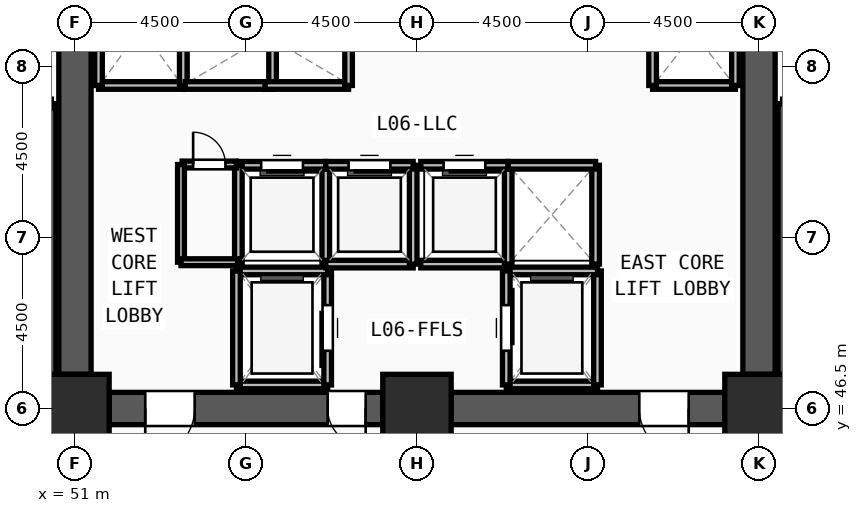
"""IFC4 building model, lengths in metres.
Left out: names, types, materials, properties, quantities, classifications, styles, units other than length and angle.
Written with IfcOpenShell. Run it as: python <this file> out.ifc"""

import sys

from ifc_helpers import new_model, si_unit, direction, frame, frame_2d, origin, origin_2d, place, context, subcontext, project, spatial, rectangle, extrude, source, transform, mapped, element, fill, save


model = new_model("IFC4")
c1 = context("Model", 3, precision=1e-05, world=origin(), true_north=direction((0.0, 1.0)))
c2 = subcontext(c1, "Body", "Model", "MODEL_VIEW")
j1 = project(units=[si_unit("LENGTHUNIT", "METRE"), si_unit("PLANEANGLEUNIT", "RADIAN")], contexts=[c1])
p1 = place(None, origin())
s1 = spatial("IfcSite", under=j1, at=p1, CompositionType="ELEMENT")
p2 = place(p1, origin())
s2 = spatial("IfcBuilding", under=s1, at=p2, CompositionType="ELEMENT")
p3 = place(p2, frame((0.0, 0.0, 23.4)))
s3 = spatial("IfcBuildingStorey", under=s2, at=p3, CompositionType="ELEMENT", Elevation=23.4)
m1 = source(origin(), c2, "Body", "SweptSolid", [
    extrude(rectangle(XDim=1.8, YDim=1.8, at=origin_2d()), origin(), (0.0, 0.0, 1.0), 5.1),
])
for number, where, z_axis, x_axis in (
    (1, (51.0, 46.5, 0.0), (0.0, 0.0, 1.0), (1.0, 0.0, 0.0)),
    (2, (60.0, 46.5, 0.0), (0.0, 0.0, 1.0), (1.0, 0.0, 0.0)),
    (3, (69.0, 46.5, 0.0), (0.0, 0.0, 1.0), (1.0, 0.0, 0.0)),
):
    element("IfcColumn", number, at=place(p3, frame(where, z_axis=z_axis, x_axis=x_axis)), inside=s3, PredefinedType="COLUMN", context=c2, shape_type="MappedRepresentation", body=[
        mapped(m1, transform((0.0, 0.0, 0.0), x_axis=(1.0, 0.0, 0.0), y_axis=(0.0, 1.0, 0.0), z_axis=(0.0, 0.0, 1.0), scale=1.0)),
    ])
p4 = place(p3, frame((69.0, 60.6, 0.0), z_axis=(0.0, 0.0, 1.0), x_axis=(0.0, -1.0, 0.0)))
e4 = element("IfcWall", 4, at=p4, inside=s3, PredefinedType="SHEAR", context=c2, shape_type="SweptSolid", body=[
    extrude(rectangle(XDim=13.2, YDim=0.85, at=frame_2d((6.6, 0.0))), origin(), (0.0, 0.0, 1.0), 4.82),
])
m2 = source(origin(), c2, "Body", "SweptSolid", [
    extrude(rectangle(XDim=1.2, YDim=2.2, at=frame_2d((0.6, 1.1))), frame((0.0, 0.435, 0.0), z_axis=(0.0, -1.0, 0.0), x_axis=(1.0, 0.0, 0.0)), (0.0, 0.0, 1.0), 0.87),
])
p5 = place(p4, frame((1.05, 0.0, 0.0)))
e5 = element("IfcOpeningElement", 5, at=p5, cuts=e4, PredefinedType="OPENING", context=c2, shape_type="MappedRepresentation", body=[
    mapped(m2, transform((0.0, 0.0, 0.0), x_axis=(1.0, 0.0, 0.0), y_axis=(0.0, 1.0, 0.0), z_axis=(0.0, 0.0, 1.0), scale=1.0)),
])
p6 = place(p3, frame((68.1, 46.5, 0.0), z_axis=(0.0, 0.0, 1.0), x_axis=(-1.0, 0.0, 0.0)))
e6 = element("IfcWall", 6, at=p6, inside=s3, PredefinedType="SHEAR", context=c2, shape_type="SweptSolid", body=[
    extrude(rectangle(XDim=7.2, YDim=0.85, at=frame_2d((3.6, 0.0))), origin(), (0.0, 0.0, 1.0), 4.82),
])
m3 = source(origin(), c2, "Body", "SweptSolid", [
    extrude(rectangle(XDim=1.3, YDim=2.2, at=frame_2d((0.65, 1.1))), frame((0.0, 0.435, 0.0), z_axis=(0.0, -1.0, 0.0), x_axis=(1.0, 0.0, 0.0)), (0.0, 0.0, 1.0), 0.87),
])
p7 = place(p6, frame((0.95, 0.0, 0.0)))
e7 = element("IfcOpeningElement", 7, at=p7, cuts=e6, PredefinedType="OPENING", context=c2, shape_type="MappedRepresentation", body=[
    mapped(m3, transform((0.0, 0.0, 0.0), x_axis=(1.0, 0.0, 0.0), y_axis=(0.0, 1.0, 0.0), z_axis=(0.0, 0.0, 1.0), scale=1.0)),
])
p8 = place(p3, frame((59.1, 46.5, 0.0), z_axis=(0.0, 0.0, 1.0), x_axis=(-1.0, 0.0, 0.0)))
e8 = element("IfcWall", 8, at=p8, inside=s3, PredefinedType="SHEAR", context=c2, shape_type="SweptSolid", body=[
    extrude(rectangle(XDim=7.2, YDim=0.85, at=frame_2d((3.6, 0.0))), origin(), (0.0, 0.0, 1.0), 4.82),
])
p9 = place(p8, frame((4.95, 0.0, 0.0)))
e9 = element("IfcOpeningElement", 9, at=p9, cuts=e8, PredefinedType="OPENING", context=c2, shape_type="MappedRepresentation", body=[
    mapped(m3, transform((0.0, 0.0, 0.0), x_axis=(1.0, 0.0, 0.0), y_axis=(0.0, 1.0, 0.0), z_axis=(0.0, 0.0, 1.0), scale=1.0)),
])
m4 = source(origin(), c2, "Body", "SweptSolid", [
    extrude(rectangle(XDim=1.0, YDim=2.2, at=frame_2d((0.5, 1.1))), frame((0.0, 0.435, 0.0), z_axis=(0.0, -1.0, 0.0), x_axis=(1.0, 0.0, 0.0)), (0.0, 0.0, 1.0), 0.87),
])
p10 = place(p8, frame((0.45, 0.0, 0.0)))
e10 = element("IfcOpeningElement", 10, at=p10, cuts=e8, PredefinedType="OPENING", context=c2, shape_type="MappedRepresentation", body=[
    mapped(m4, transform((0.0, 0.0, 0.0), x_axis=(1.0, 0.0, 0.0), y_axis=(0.0, 1.0, 0.0), z_axis=(0.0, 0.0, 1.0), scale=1.0)),
])
p11 = place(p3, frame((51.0, 47.4, 0.0), z_axis=(0.0, 0.0, 1.0), x_axis=(0.0, 1.0, 0.0)))
e11 = element("IfcWall", 11, at=p11, inside=s3, PredefinedType="SHEAR", context=c2, shape_type="SweptSolid", body=[
    extrude(rectangle(XDim=13.2, YDim=0.85, at=frame_2d((6.6, 0.0))), origin(), (0.0, 0.0, 1.0), 4.82),
])
for number, where, z_axis, x_axis in (
    (12, (50.38, 46.7, 0.0), (0.0, 0.0, 1.0), (0.0, 1.0, 0.0)),
    (13, (69.62, 54.52, 0.0), (0.0, 0.0, 1.0), (0.0, -1.0, 0.0)),
):
    element("IfcWall", number, at=place(p3, frame(where, z_axis=z_axis, x_axis=x_axis)), inside=s3, PredefinedType="SOLIDWALL", context=c2, shape_type="SweptSolid", body=[
        extrude(rectangle(XDim=7.82, YDim=0.24, at=frame_2d((3.91, 0.0))), origin(), (0.0, 0.0, 1.0), 4.82),
    ])
p12 = place(p3, frame((55.25, 47.12, 0.0), z_axis=(0.0, 0.0, 1.0), x_axis=(1.0, 0.0, 0.0)))
e14 = element("IfcWall", 14, at=p12, inside=s3, PredefinedType="SOLIDWALL", context=c2, shape_type="SweptSolid", body=[
    extrude(rectangle(XDim=2.4, YDim=0.2, at=frame_2d((1.2, 0.0))), origin(), (0.0, 0.0, 1.0), 4.82),
])
p13 = place(p3, frame((57.65, 47.12, 0.0), z_axis=(0.0, 0.0, 1.0), x_axis=(0.0, 1.0, 0.0)))
e15 = element("IfcWall", 15, at=p13, inside=s3, PredefinedType="SOLIDWALL", context=c2, shape_type="SweptSolid", body=[
    extrude(rectangle(XDim=3.0, YDim=0.2, at=frame_2d((1.5, 0.0))), origin(), (0.0, 0.0, 1.0), 4.82),
])
m5 = source(origin(), c2, "Body", "SweptSolid", [
    extrude(rectangle(XDim=1.2, YDim=2.3, at=frame_2d((0.6, 1.15))), frame((0.0, 0.11, 0.0), z_axis=(0.0, -1.0, 0.0), x_axis=(1.0, 0.0, 0.0)), (0.0, 0.0, 1.0), 0.22),
])
p14 = place(p13, frame((0.9, 0.0, 0.0)))
e16 = element("IfcOpeningElement", 16, at=p14, cuts=e15, PredefinedType="OPENING", context=c2, shape_type="MappedRepresentation", body=[
    mapped(m5, transform((0.0, 0.0, 0.0), x_axis=(1.0, 0.0, 0.0), y_axis=(0.0, 1.0, 0.0), z_axis=(0.0, 0.0, 1.0), scale=1.0)),
])
p15 = place(p3, frame((57.65, 50.12, 0.0), z_axis=(0.0, 0.0, 1.0), x_axis=(-1.0, 0.0, 0.0)))
e17 = element("IfcWall", 17, at=p15, inside=s3, PredefinedType="SOLIDWALL", context=c2, shape_type="SweptSolid", body=[
    extrude(rectangle(XDim=2.4, YDim=0.2, at=frame_2d((1.2, 0.0))), origin(), (0.0, 0.0, 1.0), 4.82),
])
p16 = place(p3, frame((55.25, 50.12, 0.0), z_axis=(0.0, 0.0, 1.0), x_axis=(0.0, -1.0, 0.0)))
e18 = element("IfcWall", 18, at=p16, inside=s3, PredefinedType="SOLIDWALL", context=c2, shape_type="SweptSolid", body=[
    extrude(rectangle(XDim=3.0, YDim=0.2, at=frame_2d((1.5, 0.0))), origin(), (0.0, 0.0, 1.0), 4.82),
])
p17 = place(p3, frame((62.35, 47.12, 0.0), z_axis=(0.0, 0.0, 1.0), x_axis=(1.0, 0.0, 0.0)))
e19 = element("IfcWall", 19, at=p17, inside=s3, PredefinedType="SOLIDWALL", context=c2, shape_type="SweptSolid", body=[
    extrude(rectangle(XDim=2.4, YDim=0.2, at=frame_2d((1.2, 0.0))), origin(), (0.0, 0.0, 1.0), 4.82),
])
p18 = place(p3, frame((64.75, 47.12, 0.0), z_axis=(0.0, 0.0, 1.0), x_axis=(0.0, 1.0, 0.0)))
e20 = element("IfcWall", 20, at=p18, inside=s3, PredefinedType="SOLIDWALL", context=c2, shape_type="SweptSolid", body=[
    extrude(rectangle(XDim=3.0, YDim=0.2, at=frame_2d((1.5, 0.0))), origin(), (0.0, 0.0, 1.0), 4.82),
])
p19 = place(p3, frame((64.75, 50.12, 0.0), z_axis=(0.0, 0.0, 1.0), x_axis=(-1.0, 0.0, 0.0)))
e21 = element("IfcWall", 21, at=p19, inside=s3, PredefinedType="SOLIDWALL", context=c2, shape_type="SweptSolid", body=[
    extrude(rectangle(XDim=2.4, YDim=0.2, at=frame_2d((1.2, 0.0))), origin(), (0.0, 0.0, 1.0), 4.82),
])
p20 = place(p3, frame((62.35, 50.12, 0.0), z_axis=(0.0, 0.0, 1.0), x_axis=(0.0, -1.0, 0.0)))
e22 = element("IfcWall", 22, at=p20, inside=s3, PredefinedType="SOLIDWALL", context=c2, shape_type="SweptSolid", body=[
    extrude(rectangle(XDim=3.0, YDim=0.2, at=frame_2d((1.5, 0.0))), origin(), (0.0, 0.0, 1.0), 4.82),
])
p21 = place(p20, frame((0.9, 0.0, 0.0)))
e23 = element("IfcOpeningElement", 23, at=p21, cuts=e22, PredefinedType="OPENING", context=c2, shape_type="MappedRepresentation", body=[
    mapped(m5, transform((0.0, 0.0, 0.0), x_axis=(1.0, 0.0, 0.0), y_axis=(0.0, 1.0, 0.0), z_axis=(0.0, 0.0, 1.0), scale=1.0)),
])
p22 = place(p3, frame((51.62, 55.0, 0.0), z_axis=(0.0, 0.0, 1.0), x_axis=(1.0, 0.0, 0.0)))
e24 = element("IfcWall", 24, at=p22, inside=s3, PredefinedType="SOLIDWALL", context=c2, shape_type="SweptSolid", body=[
    extrude(rectangle(XDim=2.23, YDim=0.2, at=frame_2d((1.115, 0.0))), origin(), (0.0, 0.0, 1.0), 4.82),
])
for number, where, z_axis, x_axis in (
    (25, (53.85, 55.0, 0.0), (0.0, 0.0, 1.0), (0.0, 1.0, 0.0)),
    (26, (51.62, 58.0, 0.0), (0.0, 0.0, 1.0), (0.0, -1.0, 0.0)),
):
    element("IfcWall", number, at=place(p3, frame(where, z_axis=z_axis, x_axis=x_axis)), inside=s3, PredefinedType="SOLIDWALL", context=c2, shape_type="SweptSolid", body=[
        extrude(rectangle(XDim=3.0, YDim=0.2, at=frame_2d((1.5, 0.0))), origin(), (0.0, 0.0, 1.0), 4.82),
    ])
p23 = place(p3, frame((66.2, 55.0, 0.0), z_axis=(0.0, 0.0, 1.0), x_axis=(1.0, 0.0, 0.0)))
e27 = element("IfcWall", 27, at=p23, inside=s3, PredefinedType="SOLIDWALL", context=c2, shape_type="SweptSolid", body=[
    extrude(rectangle(XDim=2.18, YDim=0.2, at=frame_2d((1.09, 0.0))), origin(), (0.0, 0.0, 1.0), 4.82),
])
for number, where, z_axis, x_axis in (
    (28, (68.38, 55.0, 0.0), (0.0, 0.0, 1.0), (0.0, 1.0, 0.0)),
    (29, (66.2, 57.75, 0.0), (0.0, 0.0, 1.0), (0.0, -1.0, 0.0)),
):
    element("IfcWall", number, at=place(p3, frame(where, z_axis=z_axis, x_axis=x_axis)), inside=s3, PredefinedType="SOLIDWALL", context=c2, shape_type="SweptSolid", body=[
        extrude(rectangle(XDim=2.75, YDim=0.2, at=frame_2d((1.375, 0.0))), origin(), (0.0, 0.0, 1.0), 4.82),
    ])
p24 = place(p3, frame((57.6, 50.3, 0.0), z_axis=(0.0, 0.0, 1.0), x_axis=(0.0, 1.0, 0.0)))
e30 = element("IfcWall", 30, at=p24, inside=s3, PredefinedType="SOLIDWALL", context=c2, shape_type="SweptSolid", body=[
    extrude(rectangle(XDim=2.6, YDim=0.2, at=frame_2d((1.3, 0.0))), origin(), (0.0, 0.0, 1.0), 4.82),
])
p25 = place(p3, frame((57.6, 52.9, 0.0), z_axis=(0.0, 0.0, 1.0), x_axis=(-1.0, 0.0, 0.0)))
e31 = element("IfcWall", 31, at=p25, inside=s3, PredefinedType="SOLIDWALL", context=c2, shape_type="SweptSolid", body=[
    extrude(rectangle(XDim=2.3, YDim=0.2, at=frame_2d((1.15, 0.0))), origin(), (0.0, 0.0, 1.0), 4.82),
])
m6 = source(origin(), c2, "Body", "SweptSolid", [
    extrude(rectangle(XDim=1.1, YDim=2.2, at=frame_2d((0.55, 1.1))), frame((0.0, 0.11, 0.0), z_axis=(0.0, -1.0, 0.0), x_axis=(1.0, 0.0, 0.0)), (0.0, 0.0, 1.0), 0.22),
])
p26 = place(p25, frame((0.6, 0.0, 0.0)))
e32 = element("IfcOpeningElement", 32, at=p26, cuts=e31, PredefinedType="OPENING", context=c2, shape_type="MappedRepresentation", body=[
    mapped(m6, transform((0.0, 0.0, 0.0), x_axis=(1.0, 0.0, 0.0), y_axis=(0.0, 1.0, 0.0), z_axis=(0.0, 0.0, 1.0), scale=1.0)),
])
p27 = place(p3, frame((55.3, 52.9, 0.0), z_axis=(0.0, 0.0, 1.0), x_axis=(0.0, -1.0, 0.0)))
e33 = element("IfcWall", 33, at=p27, inside=s3, PredefinedType="SOLIDWALL", context=c2, shape_type="SweptSolid", body=[
    extrude(rectangle(XDim=2.6, YDim=0.2, at=frame_2d((1.3, 0.0))), origin(), (0.0, 0.0, 1.0), 4.82),
])
p28 = place(p3, frame((57.6, 50.3, 0.0), z_axis=(0.0, 0.0, 1.0), x_axis=(1.0, 0.0, 0.0)))
e34 = element("IfcWall", 34, at=p28, inside=s3, PredefinedType="SOLIDWALL", context=c2, shape_type="SweptSolid", body=[
    extrude(rectangle(XDim=2.3, YDim=0.2, at=frame_2d((1.15, 0.0))), origin(), (0.0, 0.0, 1.0), 4.82),
])
p29 = place(p3, frame((59.9, 50.3, 0.0), z_axis=(0.0, 0.0, 1.0), x_axis=(0.0, 1.0, 0.0)))
e35 = element("IfcWall", 35, at=p29, inside=s3, PredefinedType="SOLIDWALL", context=c2, shape_type="SweptSolid", body=[
    extrude(rectangle(XDim=2.6, YDim=0.2, at=frame_2d((1.3, 0.0))), origin(), (0.0, 0.0, 1.0), 4.82),
])
p30 = place(p3, frame((59.9, 52.9, 0.0), z_axis=(0.0, 0.0, 1.0), x_axis=(-1.0, 0.0, 0.0)))
e36 = element("IfcWall", 36, at=p30, inside=s3, PredefinedType="SOLIDWALL", context=c2, shape_type="SweptSolid", body=[
    extrude(rectangle(XDim=2.3, YDim=0.2, at=frame_2d((1.15, 0.0))), origin(), (0.0, 0.0, 1.0), 4.82),
])
p31 = place(p30, frame((0.6, 0.0, 0.0)))
e37 = element("IfcOpeningElement", 37, at=p31, cuts=e36, PredefinedType="OPENING", context=c2, shape_type="MappedRepresentation", body=[
    mapped(m6, transform((0.0, 0.0, 0.0), x_axis=(1.0, 0.0, 0.0), y_axis=(0.0, 1.0, 0.0), z_axis=(0.0, 0.0, 1.0), scale=1.0)),
])
p32 = place(p3, frame((60.1, 50.3, 0.0), z_axis=(0.0, 0.0, 1.0), x_axis=(1.0, 0.0, 0.0)))
e38 = element("IfcWall", 38, at=p32, inside=s3, PredefinedType="SOLIDWALL", context=c2, shape_type="SweptSolid", body=[
    extrude(rectangle(XDim=2.3, YDim=0.2, at=frame_2d((1.15, 0.0))), origin(), (0.0, 0.0, 1.0), 4.82),
])
p33 = place(p3, frame((62.4, 50.3, 0.0), z_axis=(0.0, 0.0, 1.0), x_axis=(0.0, 1.0, 0.0)))
e39 = element("IfcWall", 39, at=p33, inside=s3, PredefinedType="SOLIDWALL", context=c2, shape_type="SweptSolid", body=[
    extrude(rectangle(XDim=2.6, YDim=0.2, at=frame_2d((1.3, 0.0))), origin(), (0.0, 0.0, 1.0), 4.82),
])
p34 = place(p3, frame((62.4, 52.9, 0.0), z_axis=(0.0, 0.0, 1.0), x_axis=(-1.0, 0.0, 0.0)))
e40 = element("IfcWall", 40, at=p34, inside=s3, PredefinedType="SOLIDWALL", context=c2, shape_type="SweptSolid", body=[
    extrude(rectangle(XDim=2.3, YDim=0.2, at=frame_2d((1.15, 0.0))), origin(), (0.0, 0.0, 1.0), 4.82),
])
p35 = place(p34, frame((0.6, 0.0, 0.0)))
e41 = element("IfcOpeningElement", 41, at=p35, cuts=e40, PredefinedType="OPENING", context=c2, shape_type="MappedRepresentation", body=[
    mapped(m6, transform((0.0, 0.0, 0.0), x_axis=(1.0, 0.0, 0.0), y_axis=(0.0, 1.0, 0.0), z_axis=(0.0, 0.0, 1.0), scale=1.0)),
])
p36 = place(p3, frame((64.7, 50.3, 0.0), z_axis=(0.0, 0.0, 1.0), x_axis=(0.0, 1.0, 0.0)))
e42 = element("IfcWall", 42, at=p36, inside=s3, PredefinedType="SOLIDWALL", context=c2, shape_type="SweptSolid", body=[
    extrude(rectangle(XDim=2.6, YDim=0.2, at=frame_2d((1.3, 0.0))), origin(), (0.0, 0.0, 1.0), 4.82),
])
for number, where, z_axis, x_axis in (
    (43, (64.7, 52.9, 0.0), (0.0, 0.0, 1.0), (-1.0, 0.0, 0.0)),
    (44, (53.9, 55.0, 0.0), (0.0, 0.0, 1.0), (1.0, 0.0, 0.0)),
):
    element("IfcWall", number, at=place(p3, frame(where, z_axis=z_axis, x_axis=x_axis)), inside=s3, PredefinedType="SOLIDWALL", context=c2, shape_type="SweptSolid", body=[
        extrude(rectangle(XDim=2.3, YDim=0.2, at=frame_2d((1.15, 0.0))), origin(), (0.0, 0.0, 1.0), 4.82),
    ])
p37 = place(p3, frame((56.2, 55.0, 0.0), z_axis=(0.0, 0.0, 1.0), x_axis=(0.0, 1.0, 0.0)))
e45 = element("IfcWall", 45, at=p37, inside=s3, PredefinedType="SOLIDWALL", context=c2, shape_type="SweptSolid", body=[
    extrude(rectangle(XDim=2.6, YDim=0.2, at=frame_2d((1.3, 0.0))), origin(), (0.0, 0.0, 1.0), 4.82),
])
p38 = place(p3, frame((56.0, 55.0, 0.0), z_axis=(0.0, 0.0, 1.0), x_axis=(1.0, 0.0, 0.0)))
e46 = element("IfcWall", 46, at=p38, inside=s3, PredefinedType="SOLIDWALL", context=c2, shape_type="SweptSolid", body=[
    extrude(rectangle(XDim=2.2, YDim=0.2, at=frame_2d((1.1, 0.0))), origin(), (0.0, 0.0, 1.0), 4.82),
])
p39 = place(p3, frame((58.2, 55.0, 0.0), z_axis=(0.0, 0.0, 1.0), x_axis=(0.0, 1.0, 0.0)))
e47 = element("IfcWall", 47, at=p39, inside=s3, PredefinedType="SOLIDWALL", context=c2, shape_type="SweptSolid", body=[
    extrude(rectangle(XDim=2.6, YDim=0.2, at=frame_2d((1.3, 0.0))), origin(), (0.0, 0.0, 1.0), 4.82),
])
p40 = place(p3, frame((53.82, 52.92, 0.0), z_axis=(0.0, 0.0, 1.0), x_axis=(1.0, 0.0, 0.0)))
e48 = element("IfcWall", 48, at=p40, inside=s3, PredefinedType="PARTITIONING", context=c2, shape_type="SweptSolid", body=[
    extrude(rectangle(XDim=1.43, YDim=0.18, at=frame_2d((0.715, 0.0))), origin(), (0.0, 0.0, 1.0), 4.82),
])
m7 = source(origin(), c2, "Body", "SweptSolid", [
    extrude(rectangle(XDim=0.85, YDim=2.1, at=frame_2d((0.425, 1.05))), frame((0.0, 0.1, 0.0), z_axis=(0.0, -1.0, 0.0), x_axis=(1.0, 0.0, 0.0)), (0.0, 0.0, 1.0), 0.2),
])
p41 = place(p40, frame((0.29, 0.0, 0.0)))
e49 = element("IfcOpeningElement", 49, at=p41, cuts=e48, PredefinedType="OPENING", context=c2, shape_type="MappedRepresentation", body=[
    mapped(m7, transform((0.0, 0.0, 0.0), x_axis=(1.0, 0.0, 0.0), y_axis=(0.0, 1.0, 0.0), z_axis=(0.0, 0.0, 1.0), scale=1.0)),
])
p42 = place(p3, frame((53.79, 50.35, 0.0), z_axis=(0.0, 0.0, 1.0), x_axis=(0.0, 1.0, 0.0)))
e50 = element("IfcWall", 50, at=p42, inside=s3, PredefinedType="PARTITIONING", context=c2, shape_type="SweptSolid", body=[
    extrude(rectangle(XDim=2.57, YDim=0.18, at=frame_2d((1.285, 0.0))), origin(), (0.0, 0.0, 1.0), 4.82),
])
p43 = place(p3, frame((53.79, 50.35, 0.0), z_axis=(0.0, 0.0, 1.0), x_axis=(1.0, 0.0, 0.0)))
e51 = element("IfcWall", 51, at=p43, inside=s3, PredefinedType="PARTITIONING", context=c2, shape_type="SweptSolid", body=[
    extrude(rectangle(XDim=1.49, YDim=0.18, at=frame_2d((0.745, 0.0))), origin(), (0.0, 0.0, 1.0), 4.82),
])
m8 = source(origin(), c2, "Body", "SweptSolid", [
    extrude(rectangle(XDim=1.3, YDim=2.2, at=frame_2d((0.65, 1.1))), frame((0.0, 0.025, 0.0), z_axis=(0.0, -1.0, 0.0), x_axis=(1.0, 0.0, 0.0)), (0.0, 0.0, 1.0), 0.05),
])
p44 = place(p9, origin())
e52 = element("IfcDoor", 52, at=p44, inside=s3, OperationType="SINGLE_SWING_RIGHT", PredefinedType="DOOR", context=c2, shape_type="MappedRepresentation", body=[
    mapped(m8, transform((0.0, 0.0, 0.0), x_axis=(1.0, 0.0, 0.0), y_axis=(0.0, 1.0, 0.0), z_axis=(0.0, 0.0, 1.0), scale=1.0)),
])
fill(e9, e52)
m9 = source(origin(), c2, "Body", "SweptSolid", [
    extrude(rectangle(XDim=1.0, YDim=2.2, at=frame_2d((0.5, 1.1))), frame((0.0, 0.025, 0.0), z_axis=(0.0, -1.0, 0.0), x_axis=(1.0, 0.0, 0.0)), (0.0, 0.0, 1.0), 0.05),
])
p45 = place(p10, origin())
e53 = element("IfcDoor", 53, at=p45, inside=s3, OperationType="SINGLE_SWING_LEFT", PredefinedType="DOOR", context=c2, shape_type="MappedRepresentation", body=[
    mapped(m9, transform((0.0, 0.0, 0.0), x_axis=(1.0, 0.0, 0.0), y_axis=(0.0, 1.0, 0.0), z_axis=(0.0, 0.0, 1.0), scale=1.0)),
])
fill(e10, e53)
p46 = place(p7, origin())
e54 = element("IfcDoor", 54, at=p46, inside=s3, OperationType="SINGLE_SWING_LEFT", PredefinedType="DOOR", context=c2, shape_type="MappedRepresentation", body=[
    mapped(m8, transform((0.0, 0.0, 0.0), x_axis=(1.0, 0.0, 0.0), y_axis=(0.0, 1.0, 0.0), z_axis=(0.0, 0.0, 1.0), scale=1.0)),
])
fill(e7, e54)
m10 = source(origin(), c2, "Body", "SweptSolid", [
    extrude(rectangle(XDim=1.2, YDim=2.3, at=frame_2d((0.6, 1.15))), frame((0.0, 0.025, 0.0), z_axis=(0.0, -1.0, 0.0), x_axis=(1.0, 0.0, 0.0)), (0.0, 0.0, 1.0), 0.05),
])
p47 = place(p14, origin())
e55 = element("IfcDoor", 55, at=p47, inside=s3, OperationType="SLIDING_TO_LEFT", PredefinedType="DOOR", context=c2, shape_type="MappedRepresentation", body=[
    mapped(m10, transform((0.0, 0.0, 0.0), x_axis=(1.0, 0.0, 0.0), y_axis=(0.0, 1.0, 0.0), z_axis=(0.0, 0.0, 1.0), scale=1.0)),
])
fill(e16, e55)
p48 = place(p21, origin())
e56 = element("IfcDoor", 56, at=p48, inside=s3, OperationType="SLIDING_TO_LEFT", PredefinedType="DOOR", context=c2, shape_type="MappedRepresentation", body=[
    mapped(m10, transform((0.0, 0.0, 0.0), x_axis=(1.0, 0.0, 0.0), y_axis=(0.0, 1.0, 0.0), z_axis=(0.0, 0.0, 1.0), scale=1.0)),
])
fill(e23, e56)
m11 = source(origin(), c2, "Body", "SweptSolid", [
    extrude(rectangle(XDim=1.1, YDim=2.2, at=frame_2d((0.55, 1.1))), frame((0.0, 0.025, 0.0), z_axis=(0.0, -1.0, 0.0), x_axis=(1.0, 0.0, 0.0)), (0.0, 0.0, 1.0), 0.05),
])
p49 = place(p26, origin())
e57 = element("IfcDoor", 57, at=p49, inside=s3, OperationType="SLIDING_TO_LEFT", PredefinedType="DOOR", context=c2, shape_type="MappedRepresentation", body=[
    mapped(m11, transform((0.0, 0.0, 0.0), x_axis=(1.0, 0.0, 0.0), y_axis=(0.0, 1.0, 0.0), z_axis=(0.0, 0.0, 1.0), scale=1.0)),
])
fill(e32, e57)
p50 = place(p31, origin())
e58 = element("IfcDoor", 58, at=p50, inside=s3, OperationType="SLIDING_TO_LEFT", PredefinedType="DOOR", context=c2, shape_type="MappedRepresentation", body=[
    mapped(m11, transform((0.0, 0.0, 0.0), x_axis=(1.0, 0.0, 0.0), y_axis=(0.0, 1.0, 0.0), z_axis=(0.0, 0.0, 1.0), scale=1.0)),
])
fill(e37, e58)
p51 = place(p35, origin())
e59 = element("IfcDoor", 59, at=p51, inside=s3, OperationType="SLIDING_TO_LEFT", PredefinedType="DOOR", context=c2, shape_type="MappedRepresentation", body=[
    mapped(m11, transform((0.0, 0.0, 0.0), x_axis=(1.0, 0.0, 0.0), y_axis=(0.0, 1.0, 0.0), z_axis=(0.0, 0.0, 1.0), scale=1.0)),
])
fill(e41, e59)
m12 = source(origin(), c2, "Body", "SweptSolid", [
    extrude(rectangle(XDim=0.85, YDim=2.1, at=frame_2d((0.425, 1.05))), frame((0.0, 0.025, 0.0), z_axis=(0.0, -1.0, 0.0), x_axis=(1.0, 0.0, 0.0)), (0.0, 0.0, 1.0), 0.05),
])
p52 = place(p41, origin())
e60 = element("IfcDoor", 60, at=p52, inside=s3, OperationType="SINGLE_SWING_LEFT", PredefinedType="DOOR", context=c2, shape_type="MappedRepresentation", body=[
    mapped(m12, transform((0.0, 0.0, 0.0), x_axis=(1.0, 0.0, 0.0), y_axis=(0.0, 1.0, 0.0), z_axis=(0.0, 0.0, 1.0), scale=1.0)),
])
fill(e49, e60)
save(model, sys.argv[1])
